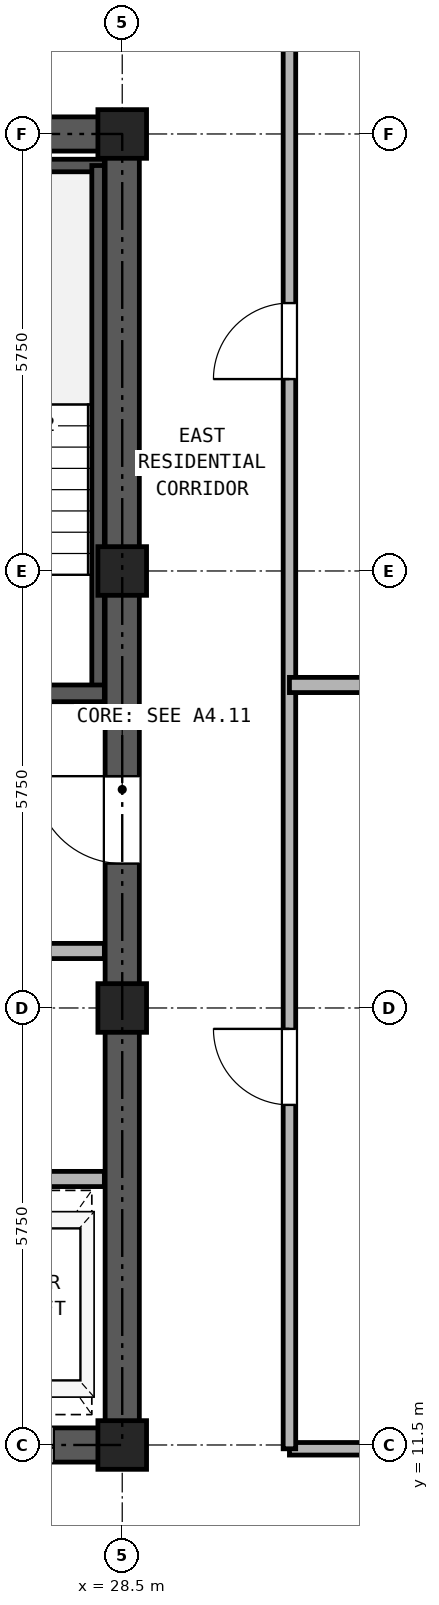
"""IFC4 building model, lengths in metres.
Left out: names, types, materials, properties, quantities, classifications, styles, units other than length and angle.
Written with IfcOpenShell. Run it as: python <this file> out.ifc"""

import sys

from ifc_helpers import new_model, si_unit, direction, frame, frame_2d, origin, origin_2d, place, context, subcontext, project, spatial, rectangle, hollow_rectangle, extrude, source, transform, mapped, element, fill, save


model = new_model("IFC4")
c1 = context("Model", 3, precision=1e-05, world=origin(), true_north=direction((0.0, 1.0)))
c2 = subcontext(c1, "Body", "Model", "MODEL_VIEW")
j1 = project(units=[si_unit("LENGTHUNIT", "METRE"), si_unit("PLANEANGLEUNIT", "RADIAN")], contexts=[c1])
p1 = place(None, origin())
s1 = spatial("IfcSite", under=j1, at=p1, CompositionType="ELEMENT")
p2 = place(p1, origin())
s2 = spatial("IfcBuilding", under=s1, at=p2, CompositionType="ELEMENT")
p3 = place(p2, frame((0.0, 0.0, 168.9)))
s3 = spatial("IfcBuildingStorey", under=s2, at=p3, CompositionType="ELEMENT", Elevation=168.9)
m1 = source(origin(), c2, "Body", "SweptSolid", [
    extrude(hollow_rectangle(XDim=0.64, YDim=0.64, WallThickness=0.035, at=origin_2d()), origin(), (0.0, 0.0, 1.0), 2.95),
])
for number, where, z_axis, x_axis in (
    (1, (28.5, 11.5, 0.0), (0.0, 0.0, 1.0), (1.0, 0.0, 0.0)),
    (2, (28.5, 17.25, 0.0), (0.0, 0.0, 1.0), (1.0, 0.0, 0.0)),
    (3, (28.5, 23.0, 0.0), (0.0, 0.0, 1.0), (1.0, 0.0, 0.0)),
    (4, (28.5, 28.75, 0.0), (0.0, 0.0, 1.0), (1.0, 0.0, 0.0)),
):
    element("IfcColumn", number, at=place(p3, frame(where, z_axis=z_axis, x_axis=x_axis)), inside=s3, PredefinedType="COLUMN", context=c2, shape_type="MappedRepresentation", body=[
        mapped(m1, transform((0.0, 0.0, 0.0), x_axis=(1.0, 0.0, 0.0), y_axis=(0.0, 1.0, 0.0), z_axis=(0.0, 0.0, 1.0), scale=1.0)),
    ])
p4 = place(p3, frame((18.275, 11.5, 0.0), z_axis=(0.0, 0.0, 1.0), x_axis=(1.0, 0.0, 0.0)))
e5 = element("IfcWall", 5, at=p4, inside=s3, PredefinedType="SHEAR", context=c2, shape_type="SweptSolid", body=[
    extrude(rectangle(XDim=10.45, YDim=0.45, at=frame_2d((5.225, 0.0))), origin(), (0.0, 0.0, 1.0), 2.95),
])
p5 = place(p4, frame((1.825, 0.0, 0.0)))
e6 = element("IfcOpeningElement", 6, at=p5, cuts=e5, PredefinedType="OPENING", context=c2, shape_type="SweptSolid", body=[
    extrude(rectangle(XDim=0.95, YDim=2.15, at=frame_2d((0.475, 1.075))), frame((0.0, 0.235, 0.0), z_axis=(0.0, -1.0, 0.0), x_axis=(1.0, 0.0, 0.0)), (0.0, 0.0, 1.0), 0.47),
])
p6 = place(p4, frame((5.325, 0.0, 0.0)))
e7 = element("IfcOpeningElement", 7, at=p6, cuts=e5, PredefinedType="OPENING", context=c2, shape_type="SweptSolid", body=[
    extrude(rectangle(XDim=0.95, YDim=2.15, at=frame_2d((0.475, 1.075))), frame((0.0, 0.235, 0.0), z_axis=(0.0, -1.0, 0.0), x_axis=(1.0, 0.0, 0.0)), (0.0, 0.0, 1.0), 0.47),
])
p7 = place(p4, frame((8.225, 0.0, 0.0)))
e8 = element("IfcOpeningElement", 8, at=p7, cuts=e5, PredefinedType="OPENING", context=c2, shape_type="SweptSolid", body=[
    extrude(rectangle(XDim=1.1, YDim=2.25, at=frame_2d((0.55, 1.125))), frame((0.0, 0.235, 0.0), z_axis=(0.0, -1.0, 0.0), x_axis=(1.0, 0.0, 0.0)), (0.0, 0.0, 1.0), 0.47),
])
p8 = place(p3, frame((18.275, 28.75, 0.0), z_axis=(0.0, 0.0, 1.0), x_axis=(1.0, 0.0, 0.0)))
e9 = element("IfcWall", 9, at=p8, inside=s3, PredefinedType="SHEAR", context=c2, shape_type="SweptSolid", body=[
    extrude(rectangle(XDim=10.45, YDim=0.45, at=frame_2d((5.225, 0.0))), origin(), (0.0, 0.0, 1.0), 2.95),
])
p9 = place(p8, frame((4.105, 0.0, 0.0)))
e10 = element("IfcOpeningElement", 10, at=p9, cuts=e9, PredefinedType="OPENING", context=c2, shape_type="SweptSolid", body=[
    extrude(rectangle(XDim=0.9, YDim=2.05, at=frame_2d((0.45, 1.025))), frame((0.0, 0.235, 0.0), z_axis=(0.0, -1.0, 0.0), x_axis=(1.0, 0.0, 0.0)), (0.0, 0.0, 1.0), 0.47),
])
p10 = place(p8, frame((5.645, 0.0, 0.0)))
e11 = element("IfcOpeningElement", 11, at=p10, cuts=e9, PredefinedType="OPENING", context=c2, shape_type="SweptSolid", body=[
    extrude(rectangle(XDim=0.9, YDim=2.05, at=frame_2d((0.45, 1.025))), frame((0.0, 0.235, 0.0), z_axis=(0.0, -1.0, 0.0), x_axis=(1.0, 0.0, 0.0)), (0.0, 0.0, 1.0), 0.47),
])
p11 = place(p3, frame((28.5, 11.725, 0.0), z_axis=(0.0, 0.0, 1.0), x_axis=(0.0, 1.0, 0.0)))
e12 = element("IfcWall", 12, at=p11, inside=s3, PredefinedType="SHEAR", context=c2, shape_type="SweptSolid", body=[
    extrude(rectangle(XDim=16.8, YDim=0.45, at=frame_2d((8.4, 0.0))), origin(), (0.0, 0.0, 1.0), 2.95),
])
p12 = place(p11, frame((7.425, 0.0, 0.0)))
e13 = element("IfcOpeningElement", 13, at=p12, cuts=e12, PredefinedType="OPENING", context=c2, shape_type="SweptSolid", body=[
    extrude(rectangle(XDim=1.15, YDim=2.2, at=frame_2d((0.575, 1.1))), frame((0.0, 0.235, 0.0), z_axis=(0.0, -1.0, 0.0), x_axis=(1.0, 0.0, 0.0)), (0.0, 0.0, 1.0), 0.47),
])
p13 = place(p3, frame((25.13, 28.335, 0.0), z_axis=(0.0, 0.0, 1.0), x_axis=(1.0, 0.0, 0.0)))
e14 = element("IfcWall", 14, at=p13, inside=s3, PredefinedType="PARTITIONING", context=c2, shape_type="SweptSolid", body=[
    extrude(rectangle(XDim=3.135, YDim=0.165, at=frame_2d((1.567, 0.0))), origin(), (0.0, 0.0, 1.0), 2.95),
])
p14 = place(p3, frame((28.183, 21.39, 0.0), z_axis=(0.0, 0.0, 1.0), x_axis=(0.0, 1.0, 0.0)))
e15 = element("IfcWall", 15, at=p14, inside=s3, PredefinedType="PARTITIONING", context=c2, shape_type="SweptSolid", body=[
    extrude(rectangle(XDim=6.945, YDim=0.165, at=frame_2d((3.473, 0.0))), origin(), (0.0, 0.0, 1.0), 2.95),
])
p15 = place(p3, frame((25.13, 21.39, 0.0), z_axis=(0.0, 0.0, 1.0), x_axis=(1.0, 0.0, 0.0)))
e16 = element("IfcWall", 16, at=p15, inside=s3, PredefinedType="SOLIDWALL", context=c2, shape_type="SweptSolid", body=[
    extrude(rectangle(XDim=3.135, YDim=0.22, at=frame_2d((1.567, 0.0))), origin(), (0.0, 0.0, 1.0), 2.95),
])
p16 = place(p15, frame((0.92, 0.0, 0.0)))
e17 = element("IfcOpeningElement", 17, at=p16, cuts=e16, PredefinedType="OPENING", context=c2, shape_type="SweptSolid", body=[
    extrude(rectangle(XDim=1.15, YDim=2.2, at=frame_2d((0.575, 1.1))), frame((0.0, 0.12, 0.0), z_axis=(0.0, -1.0, 0.0), x_axis=(1.0, 0.0, 0.0)), (0.0, 0.0, 1.0), 0.24),
])
p17 = place(p3, frame((18.735, 18.0, 0.0), z_axis=(0.0, 0.0, 1.0), x_axis=(1.0, 0.0, 0.0)))
e18 = element("IfcWall", 18, at=p17, inside=s3, PredefinedType="PARTITIONING", context=c2, shape_type="SweptSolid", body=[
    extrude(rectangle(XDim=9.53, YDim=0.2, at=frame_2d((4.765, 0.0))), origin(), (0.0, 0.0, 1.0), 2.95),
])
p18 = place(p17, frame((0.515, 0.0, 0.0)))
e19 = element("IfcOpeningElement", 19, at=p18, cuts=e18, PredefinedType="OPENING", context=c2, shape_type="SweptSolid", body=[
    extrude(rectangle(XDim=1.3, YDim=2.3, at=frame_2d((0.65, 1.15))), frame((0.0, 0.11, 0.0), z_axis=(0.0, -1.0, 0.0), x_axis=(1.0, 0.0, 0.0)), (0.0, 0.0, 1.0), 0.22),
])
p19 = place(p17, frame((2.615, 0.0, 0.0)))
e20 = element("IfcOpeningElement", 20, at=p19, cuts=e18, PredefinedType="OPENING", context=c2, shape_type="SweptSolid", body=[
    extrude(rectangle(XDim=1.3, YDim=2.3, at=frame_2d((0.65, 1.15))), frame((0.0, 0.11, 0.0), z_axis=(0.0, -1.0, 0.0), x_axis=(1.0, 0.0, 0.0)), (0.0, 0.0, 1.0), 0.22),
])
p20 = place(p17, frame((7.115, 0.0, 0.0)))
e21 = element("IfcOpeningElement", 21, at=p20, cuts=e18, PredefinedType="OPENING", context=c2, shape_type="SweptSolid", body=[
    extrude(rectangle(XDim=1.0, YDim=2.15, at=frame_2d((0.5, 1.075))), frame((0.0, 0.11, 0.0), z_axis=(0.0, -1.0, 0.0), x_axis=(1.0, 0.0, 0.0)), (0.0, 0.0, 1.0), 0.22),
])
p21 = place(p3, frame((18.735, 15.0, 0.0), z_axis=(0.0, 0.0, 1.0), x_axis=(1.0, 0.0, 0.0)))
e22 = element("IfcWall", 22, at=p21, inside=s3, PredefinedType="PARTITIONING", context=c2, shape_type="SweptSolid", body=[
    extrude(rectangle(XDim=9.53, YDim=0.2, at=frame_2d((4.765, 0.0))), origin(), (0.0, 0.0, 1.0), 2.95),
])
p22 = place(p3, frame((30.7, 11.45, 0.0), z_axis=(0.0, 0.0, 1.0), x_axis=(1.0, 0.0, 0.0)))
e23 = element("IfcWall", 23, at=p22, inside=s3, PredefinedType="PARTITIONING", context=c2, shape_type="SweptSolid", body=[
    extrude(rectangle(XDim=7.5, YDim=0.165, at=frame_2d((3.75, 0.0))), origin(), (0.0, 0.0, 1.0), 2.323),
])
p23 = place(p3, frame((30.7, 11.45, 0.0), z_axis=(0.0, 0.0, 1.0), x_axis=(0.0, 1.0, 0.0)))
e24 = element("IfcWall", 24, at=p23, inside=s3, PredefinedType="PARTITIONING", context=c2, shape_type="SweptSolid", body=[
    extrude(rectangle(XDim=23.69, YDim=0.165, at=frame_2d((11.845, 0.0))), origin(), (0.0, 0.0, 1.0), 2.95),
])
p24 = place(p23, frame((4.525, 0.0, 0.0)))
e25 = element("IfcOpeningElement", 25, at=p24, cuts=e24, PredefinedType="OPENING", context=c2, shape_type="SweptSolid", body=[
    extrude(rectangle(XDim=1.0, YDim=2.15, at=frame_2d((0.5, 1.075))), frame((0.0, 0.093, 0.0), z_axis=(0.0, -1.0, 0.0), x_axis=(1.0, 0.0, 0.0)), (0.0, 0.0, 1.0), 0.185),
])
p25 = place(p23, frame((14.075, 0.0, 0.0)))
e26 = element("IfcOpeningElement", 26, at=p25, cuts=e24, PredefinedType="OPENING", context=c2, shape_type="SweptSolid", body=[
    extrude(rectangle(XDim=1.0, YDim=2.15, at=frame_2d((0.5, 1.075))), frame((0.0, 0.093, 0.0), z_axis=(0.0, -1.0, 0.0), x_axis=(1.0, 0.0, 0.0)), (0.0, 0.0, 1.0), 0.185),
])
p26 = place(p3, frame((30.7, 21.5, 0.0), z_axis=(0.0, 0.0, 1.0), x_axis=(1.0, 0.0, 0.0)))
e27 = element("IfcWall", 27, at=p26, inside=s3, PredefinedType="PARTITIONING", context=c2, shape_type="SweptSolid", body=[
    extrude(rectangle(XDim=10.94, YDim=0.2, at=frame_2d((5.47, 0.0))), origin(), (0.0, 0.0, 1.0), 2.95),
])
p27 = place(p12, origin())
e28 = element("IfcDoor", 28, at=p27, inside=s3, OperationType="SINGLE_SWING_RIGHT", PredefinedType="DOOR", context=c2, shape_type="SweptSolid", body=[
    extrude(rectangle(XDim=1.15, YDim=2.2, at=frame_2d((0.575, 1.1))), frame((0.0, 0.025, 0.0), z_axis=(0.0, -1.0, 0.0), x_axis=(1.0, 0.0, 0.0)), (0.0, 0.0, 1.0), 0.05),
])
fill(e13, e28)
p28 = place(p7, frame((1.1, 0.0, 0.0), z_axis=(0.0, 0.0, 1.0), x_axis=(-1.0, 0.0, 0.0)))
e29 = element("IfcDoor", 29, at=p28, inside=s3, OperationType="DOUBLE_DOOR_SLIDING", PredefinedType="DOOR", context=c2, shape_type="SweptSolid", body=[
    extrude(rectangle(XDim=1.1, YDim=2.25, at=frame_2d((0.55, 1.125))), frame((0.0, 0.025, 0.0), z_axis=(0.0, -1.0, 0.0), x_axis=(1.0, 0.0, 0.0)), (0.0, 0.0, 1.0), 0.05),
])
fill(e8, e29)
p29 = place(p24, frame((1.0, 0.0, 0.0), z_axis=(0.0, 0.0, 1.0), x_axis=(-1.0, 0.0, 0.0)))
e30 = element("IfcDoor", 30, at=p29, inside=s3, OperationType="SINGLE_SWING_RIGHT", PredefinedType="DOOR", context=c2, shape_type="SweptSolid", body=[
    extrude(rectangle(XDim=1.0, YDim=2.15, at=frame_2d((0.5, 1.075))), frame((0.0, 0.025, 0.0), z_axis=(0.0, -1.0, 0.0), x_axis=(1.0, 0.0, 0.0)), (0.0, 0.0, 1.0), 0.05),
])
fill(e25, e30)
p30 = place(p25, frame((1.0, 0.0, 0.0), z_axis=(0.0, 0.0, 1.0), x_axis=(-1.0, 0.0, 0.0)))
e31 = element("IfcDoor", 31, at=p30, inside=s3, OperationType="SINGLE_SWING_LEFT", PredefinedType="DOOR", context=c2, shape_type="SweptSolid", body=[
    extrude(rectangle(XDim=1.0, YDim=2.15, at=frame_2d((0.5, 1.075))), frame((0.0, 0.025, 0.0), z_axis=(0.0, -1.0, 0.0), x_axis=(1.0, 0.0, 0.0)), (0.0, 0.0, 1.0), 0.05),
])
fill(e26, e31)
save(model, sys.argv[1])
